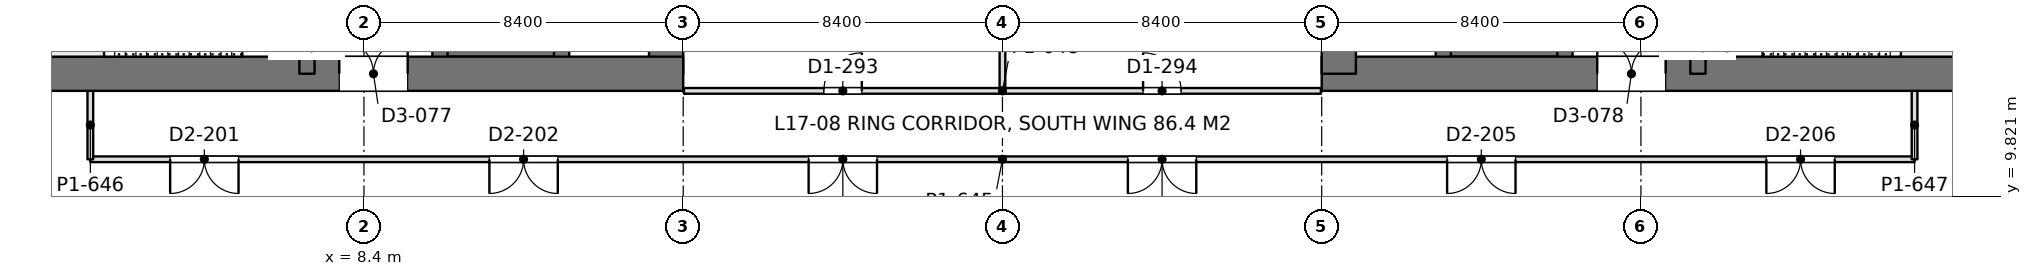
"""IFC4 building model, lengths in metres.
Left out: names, types, materials, properties, quantities, classifications, styles, units other than length and angle.
Written with IfcOpenShell. Run it as: python <this file> out.ifc"""

import sys

from ifc_helpers import new_model, si_unit, direction, frame, frame_2d, origin, place, context, subcontext, project, spatial, rectangle, extrude, element, fill, save


model = new_model("IFC4")
c1 = context("Model", 3, precision=1e-05, world=origin(), true_north=direction((0.0, 1.0)))
c2 = subcontext(c1, "Body", "Model", "MODEL_VIEW")
j1 = project(units=[si_unit("LENGTHUNIT", "METRE"), si_unit("PLANEANGLEUNIT", "RADIAN")], contexts=[c1])
p1 = place(None, origin())
s1 = spatial("IfcSite", under=j1, at=p1, CompositionType="ELEMENT")
p2 = place(p1, origin())
s2 = spatial("IfcBuilding", under=s1, at=p2, CompositionType="ELEMENT")
p3 = place(p2, frame((0.0, 0.0, 77.4)))
s3 = spatial("IfcBuildingStorey", under=s2, at=p3, CompositionType="ELEMENT", Elevation=77.4)
p4 = place(p3, frame((-1.2, 13.05, 0.0), z_axis=(0.0, 0.0, 1.0), x_axis=(1.0, 0.0, 0.0)))
e1 = element("IfcWall", 1, at=p4, inside=s3, PredefinedType="SHEAR", context=c2, shape_type="SweptSolid", body=[
    extrude(rectangle(XDim=18.0, YDim=0.9, at=frame_2d((9.0, 0.0))), origin(), (0.0, 0.0, 1.0), 4.5),
])
p5 = place(p4, frame((8.95, 0.0, 0.0)))
e2 = element("IfcOpeningElement", 2, at=p5, cuts=e1, PredefinedType="OPENING", context=c2, shape_type="SweptSolid", body=[
    extrude(rectangle(XDim=1.8, YDim=2.4, at=frame_2d((0.9, 1.2))), frame((0.0, 0.46, 0.0), z_axis=(0.0, -1.0, 0.0), x_axis=(1.0, 0.0, 0.0)), (0.0, 0.0, 1.0), 0.92),
])
p6 = place(p3, frame((16.35, 13.05, 0.0), z_axis=(0.0, 0.0, 1.0), x_axis=(0.0, 1.0, 0.0)))
e3 = element("IfcWall", 3, at=p6, inside=s3, PredefinedType="SHEAR", context=c2, shape_type="SweptSolid", body=[
    extrude(rectangle(XDim=24.3, YDim=0.9, at=frame_2d((12.15, 0.0))), origin(), (0.0, 0.0, 1.0), 4.5),
])
p7 = place(p3, frame((6.9, 13.05, 0.0), z_axis=(0.0, 0.0, 1.0), x_axis=(0.0, 1.0, 0.0)))
e4 = element("IfcWall", 4, at=p7, inside=s3, PredefinedType="SHEAR", context=c2, shape_type="SweptSolid", body=[
    extrude(rectangle(XDim=24.3, YDim=0.4, at=frame_2d((12.15, 0.0))), origin(), (0.0, 0.0, 1.0), 4.5),
])
p8 = place(p7, frame((1.3, 0.0, 0.0)))
e5 = element("IfcOpeningElement", 5, at=p8, cuts=e4, PredefinedType="OPENING", context=c2, shape_type="SweptSolid", body=[
    extrude(rectangle(XDim=1.0, YDim=2.2, at=frame_2d((0.5, 1.1))), frame((0.0, 0.21, 0.0), z_axis=(0.0, -1.0, 0.0), x_axis=(1.0, 0.0, 0.0)), (0.0, 0.0, 1.0), 0.42),
])
p9 = place(p7, frame((22.0, 0.0, 0.0)))
e6 = element("IfcOpeningElement", 6, at=p9, cuts=e4, PredefinedType="OPENING", context=c2, shape_type="SweptSolid", body=[
    extrude(rectangle(XDim=1.0, YDim=2.2, at=frame_2d((0.5, 1.1))), frame((0.0, 0.21, 0.0), z_axis=(0.0, -1.0, 0.0), x_axis=(1.0, 0.0, 0.0)), (0.0, 0.0, 1.0), 0.42),
])
p10 = place(p7, frame((5.55, 0.0, 0.0)))
e7 = element("IfcOpeningElement", 7, at=p10, cuts=e4, PredefinedType="OPENING", context=c2, shape_type="SweptSolid", body=[
    extrude(rectangle(XDim=1.0, YDim=2.2, at=frame_2d((0.5, 1.1))), frame((0.0, 0.21, 0.0), z_axis=(0.0, -1.0, 0.0), x_axis=(1.0, 0.0, 0.0)), (0.0, 0.0, 1.0), 0.42),
])
p11 = place(p7, frame((9.55, 0.0, 0.0)))
e8 = element("IfcOpeningElement", 8, at=p11, cuts=e4, PredefinedType="OPENING", context=c2, shape_type="SweptSolid", body=[
    extrude(rectangle(XDim=1.0, YDim=2.2, at=frame_2d((0.5, 1.1))), frame((0.0, 0.21, 0.0), z_axis=(0.0, -1.0, 0.0), x_axis=(1.0, 0.0, 0.0)), (0.0, 0.0, 1.0), 0.42),
])
p12 = place(p7, frame((12.8, 0.0, 0.0)))
e9 = element("IfcOpeningElement", 9, at=p12, cuts=e4, PredefinedType="OPENING", context=c2, shape_type="SweptSolid", body=[
    extrude(rectangle(XDim=1.1, YDim=2.2, at=frame_2d((0.55, 1.1))), frame((0.0, 0.21, 0.0), z_axis=(0.0, -1.0, 0.0), x_axis=(1.0, 0.0, 0.0)), (0.0, 0.0, 1.0), 0.42),
])
p13 = place(p7, frame((15.538, 0.0, 0.0)))
e10 = element("IfcOpeningElement", 10, at=p13, cuts=e4, PredefinedType="OPENING", context=c2, shape_type="SweptSolid", body=[
    extrude(rectangle(XDim=1.1, YDim=2.2, at=frame_2d((0.55, 1.1))), frame((0.0, 0.21, 0.0), z_axis=(0.0, -1.0, 0.0), x_axis=(1.0, 0.0, 0.0)), (0.0, 0.0, 1.0), 0.42),
])
p14 = place(p7, frame((18.262, 0.0, 0.0)))
e11 = element("IfcOpeningElement", 11, at=p14, cuts=e4, PredefinedType="OPENING", context=c2, shape_type="SweptSolid", body=[
    extrude(rectangle(XDim=1.1, YDim=2.2, at=frame_2d((0.55, 1.1))), frame((0.0, 0.21, 0.0), z_axis=(0.0, -1.0, 0.0), x_axis=(1.0, 0.0, 0.0)), (0.0, 0.0, 1.0), 0.42),
])
p15 = place(p3, frame((10.4, 13.05, 0.0), z_axis=(0.0, 0.0, 1.0), x_axis=(0.0, 1.0, 0.0)))
e12 = element("IfcWall", 12, at=p15, inside=s3, PredefinedType="SHEAR", context=c2, shape_type="SweptSolid", body=[
    extrude(rectangle(XDim=24.3, YDim=0.4, at=frame_2d((12.15, 0.0))), origin(), (0.0, 0.0, 1.0), 4.5),
])
p16 = place(p15, frame((1.5, 0.0, 0.0)))
e13 = element("IfcOpeningElement", 13, at=p16, cuts=e12, PredefinedType="OPENING", context=c2, shape_type="SweptSolid", body=[
    extrude(rectangle(XDim=1.1, YDim=2.2, at=frame_2d((0.55, 1.1))), frame((0.0, 0.21, 0.0), z_axis=(0.0, -1.0, 0.0), x_axis=(1.0, 0.0, 0.0)), (0.0, 0.0, 1.0), 0.42),
])
p17 = place(p15, frame((4.35, 0.0, 0.0)))
e14 = element("IfcOpeningElement", 14, at=p17, cuts=e12, PredefinedType="OPENING", context=c2, shape_type="SweptSolid", body=[
    extrude(rectangle(XDim=1.1, YDim=2.2, at=frame_2d((0.55, 1.1))), frame((0.0, 0.21, 0.0), z_axis=(0.0, -1.0, 0.0), x_axis=(1.0, 0.0, 0.0)), (0.0, 0.0, 1.0), 0.42),
])
p18 = place(p15, frame((7.2, 0.0, 0.0)))
e15 = element("IfcOpeningElement", 15, at=p18, cuts=e12, PredefinedType="OPENING", context=c2, shape_type="SweptSolid", body=[
    extrude(rectangle(XDim=1.1, YDim=2.2, at=frame_2d((0.55, 1.1))), frame((0.0, 0.21, 0.0), z_axis=(0.0, -1.0, 0.0), x_axis=(1.0, 0.0, 0.0)), (0.0, 0.0, 1.0), 0.42),
])
p19 = place(p15, frame((21.45, 0.0, 0.0)))
e16 = element("IfcOpeningElement", 16, at=p19, cuts=e12, PredefinedType="OPENING", context=c2, shape_type="SweptSolid", body=[
    extrude(rectangle(XDim=1.1, YDim=2.2, at=frame_2d((0.55, 1.1))), frame((0.0, 0.21, 0.0), z_axis=(0.0, -1.0, 0.0), x_axis=(1.0, 0.0, 0.0)), (0.0, 0.0, 1.0), 0.42),
])
p20 = place(p3, frame((13.6, 13.05, 0.0), z_axis=(0.0, 0.0, 1.0), x_axis=(0.0, 1.0, 0.0)))
e17 = element("IfcWall", 17, at=p20, inside=s3, PredefinedType="SHEAR", context=c2, shape_type="SweptSolid", body=[
    extrude(rectangle(XDim=24.3, YDim=0.4, at=frame_2d((12.15, 0.0))), origin(), (0.0, 0.0, 1.0), 4.5),
])
p21 = place(p3, frame((10.4, 13.65, 0.0), z_axis=(0.0, 0.0, 1.0), x_axis=(1.0, 0.0, 0.0)))
e18 = element("IfcWall", 18, at=p21, inside=s3, PredefinedType="SHEAR", context=c2, shape_type="SweptSolid", body=[
    extrude(rectangle(XDim=3.2, YDim=0.3, at=frame_2d((1.6, 0.0))), origin(), (0.0, 0.0, 1.0), 4.5),
])
p22 = place(p3, frame((33.6, 13.05, 0.0), z_axis=(0.0, 0.0, 1.0), x_axis=(1.0, 0.0, 0.0)))
e19 = element("IfcWall", 19, at=p22, inside=s3, PredefinedType="SHEAR", context=c2, shape_type="SweptSolid", body=[
    extrude(rectangle(XDim=18.0, YDim=0.9, at=frame_2d((9.0, 0.0))), origin(), (0.0, 0.0, 1.0), 4.5),
])
p23 = place(p22, frame((7.25, 0.0, 0.0)))
e20 = element("IfcOpeningElement", 20, at=p23, cuts=e19, PredefinedType="OPENING", context=c2, shape_type="SweptSolid", body=[
    extrude(rectangle(XDim=1.8, YDim=2.4, at=frame_2d((0.9, 1.2))), frame((0.0, 0.46, 0.0), z_axis=(0.0, -1.0, 0.0), x_axis=(1.0, 0.0, 0.0)), (0.0, 0.0, 1.0), 0.92),
])
p24 = place(p3, frame((34.05, 13.05, 0.0), z_axis=(0.0, 0.0, 1.0), x_axis=(0.0, 1.0, 0.0)))
e21 = element("IfcWall", 21, at=p24, inside=s3, PredefinedType="SHEAR", context=c2, shape_type="SweptSolid", body=[
    extrude(rectangle(XDim=24.3, YDim=0.9, at=frame_2d((12.15, 0.0))), origin(), (0.0, 0.0, 1.0), 4.5),
])
p25 = place(p3, frame((43.5, 13.05, 0.0), z_axis=(0.0, 0.0, 1.0), x_axis=(0.0, 1.0, 0.0)))
e22 = element("IfcWall", 22, at=p25, inside=s3, PredefinedType="SHEAR", context=c2, shape_type="SweptSolid", body=[
    extrude(rectangle(XDim=24.3, YDim=0.4, at=frame_2d((12.15, 0.0))), origin(), (0.0, 0.0, 1.0), 4.5),
])
p26 = place(p25, frame((1.3, 0.0, 0.0)))
e23 = element("IfcOpeningElement", 23, at=p26, cuts=e22, PredefinedType="OPENING", context=c2, shape_type="SweptSolid", body=[
    extrude(rectangle(XDim=1.0, YDim=2.2, at=frame_2d((0.5, 1.1))), frame((0.0, 0.21, 0.0), z_axis=(0.0, -1.0, 0.0), x_axis=(1.0, 0.0, 0.0)), (0.0, 0.0, 1.0), 0.42),
])
p27 = place(p25, frame((22.0, 0.0, 0.0)))
e24 = element("IfcOpeningElement", 24, at=p27, cuts=e22, PredefinedType="OPENING", context=c2, shape_type="SweptSolid", body=[
    extrude(rectangle(XDim=1.0, YDim=2.2, at=frame_2d((0.5, 1.1))), frame((0.0, 0.21, 0.0), z_axis=(0.0, -1.0, 0.0), x_axis=(1.0, 0.0, 0.0)), (0.0, 0.0, 1.0), 0.42),
])
p28 = place(p25, frame((5.55, 0.0, 0.0)))
e25 = element("IfcOpeningElement", 25, at=p28, cuts=e22, PredefinedType="OPENING", context=c2, shape_type="SweptSolid", body=[
    extrude(rectangle(XDim=1.0, YDim=2.2, at=frame_2d((0.5, 1.1))), frame((0.0, 0.21, 0.0), z_axis=(0.0, -1.0, 0.0), x_axis=(1.0, 0.0, 0.0)), (0.0, 0.0, 1.0), 0.42),
])
p29 = place(p25, frame((9.55, 0.0, 0.0)))
e26 = element("IfcOpeningElement", 26, at=p29, cuts=e22, PredefinedType="OPENING", context=c2, shape_type="SweptSolid", body=[
    extrude(rectangle(XDim=1.0, YDim=2.2, at=frame_2d((0.5, 1.1))), frame((0.0, 0.21, 0.0), z_axis=(0.0, -1.0, 0.0), x_axis=(1.0, 0.0, 0.0)), (0.0, 0.0, 1.0), 0.42),
])
p30 = place(p25, frame((12.8, 0.0, 0.0)))
e27 = element("IfcOpeningElement", 27, at=p30, cuts=e22, PredefinedType="OPENING", context=c2, shape_type="SweptSolid", body=[
    extrude(rectangle(XDim=1.1, YDim=2.2, at=frame_2d((0.55, 1.1))), frame((0.0, 0.21, 0.0), z_axis=(0.0, -1.0, 0.0), x_axis=(1.0, 0.0, 0.0)), (0.0, 0.0, 1.0), 0.42),
])
p31 = place(p25, frame((15.538, 0.0, 0.0)))
e28 = element("IfcOpeningElement", 28, at=p31, cuts=e22, PredefinedType="OPENING", context=c2, shape_type="SweptSolid", body=[
    extrude(rectangle(XDim=1.1, YDim=2.2, at=frame_2d((0.55, 1.1))), frame((0.0, 0.21, 0.0), z_axis=(0.0, -1.0, 0.0), x_axis=(1.0, 0.0, 0.0)), (0.0, 0.0, 1.0), 0.42),
])
p32 = place(p25, frame((18.262, 0.0, 0.0)))
e29 = element("IfcOpeningElement", 29, at=p32, cuts=e22, PredefinedType="OPENING", context=c2, shape_type="SweptSolid", body=[
    extrude(rectangle(XDim=1.1, YDim=2.2, at=frame_2d((0.55, 1.1))), frame((0.0, 0.21, 0.0), z_axis=(0.0, -1.0, 0.0), x_axis=(1.0, 0.0, 0.0)), (0.0, 0.0, 1.0), 0.42),
])
p33 = place(p3, frame((40.0, 13.05, 0.0), z_axis=(0.0, 0.0, 1.0), x_axis=(0.0, 1.0, 0.0)))
e30 = element("IfcWall", 30, at=p33, inside=s3, PredefinedType="SHEAR", context=c2, shape_type="SweptSolid", body=[
    extrude(rectangle(XDim=24.3, YDim=0.4, at=frame_2d((12.15, 0.0))), origin(), (0.0, 0.0, 1.0), 4.5),
])
p34 = place(p33, frame((1.5, 0.0, 0.0)))
e31 = element("IfcOpeningElement", 31, at=p34, cuts=e30, PredefinedType="OPENING", context=c2, shape_type="SweptSolid", body=[
    extrude(rectangle(XDim=1.1, YDim=2.2, at=frame_2d((0.55, 1.1))), frame((0.0, 0.21, 0.0), z_axis=(0.0, -1.0, 0.0), x_axis=(1.0, 0.0, 0.0)), (0.0, 0.0, 1.0), 0.42),
])
p35 = place(p33, frame((4.35, 0.0, 0.0)))
e32 = element("IfcOpeningElement", 32, at=p35, cuts=e30, PredefinedType="OPENING", context=c2, shape_type="SweptSolid", body=[
    extrude(rectangle(XDim=1.1, YDim=2.2, at=frame_2d((0.55, 1.1))), frame((0.0, 0.21, 0.0), z_axis=(0.0, -1.0, 0.0), x_axis=(1.0, 0.0, 0.0)), (0.0, 0.0, 1.0), 0.42),
])
p36 = place(p33, frame((7.2, 0.0, 0.0)))
e33 = element("IfcOpeningElement", 33, at=p36, cuts=e30, PredefinedType="OPENING", context=c2, shape_type="SweptSolid", body=[
    extrude(rectangle(XDim=1.1, YDim=2.2, at=frame_2d((0.55, 1.1))), frame((0.0, 0.21, 0.0), z_axis=(0.0, -1.0, 0.0), x_axis=(1.0, 0.0, 0.0)), (0.0, 0.0, 1.0), 0.42),
])
p37 = place(p33, frame((21.45, 0.0, 0.0)))
e34 = element("IfcOpeningElement", 34, at=p37, cuts=e30, PredefinedType="OPENING", context=c2, shape_type="SweptSolid", body=[
    extrude(rectangle(XDim=1.1, YDim=2.2, at=frame_2d((0.55, 1.1))), frame((0.0, 0.21, 0.0), z_axis=(0.0, -1.0, 0.0), x_axis=(1.0, 0.0, 0.0)), (0.0, 0.0, 1.0), 0.42),
])
p38 = place(p3, frame((36.8, 13.05, 0.0), z_axis=(0.0, 0.0, 1.0), x_axis=(0.0, 1.0, 0.0)))
e35 = element("IfcWall", 35, at=p38, inside=s3, PredefinedType="SHEAR", context=c2, shape_type="SweptSolid", body=[
    extrude(rectangle(XDim=24.3, YDim=0.4, at=frame_2d((12.15, 0.0))), origin(), (0.0, 0.0, 1.0), 4.5),
])
p39 = place(p3, frame((40.0, 13.65, 0.0), z_axis=(0.0, 0.0, 1.0), x_axis=(-1.0, 0.0, 0.0)))
e36 = element("IfcWall", 36, at=p39, inside=s3, PredefinedType="SHEAR", context=c2, shape_type="SweptSolid", body=[
    extrude(rectangle(XDim=3.2, YDim=0.3, at=frame_2d((1.6, 0.0))), origin(), (0.0, 0.0, 1.0), 4.5),
])
p40 = place(p3, frame((1.2, 10.8, 0.0), z_axis=(0.0, 0.0, 1.0), x_axis=(1.0, 0.0, 0.0)))
e37 = element("IfcWall", 37, at=p40, inside=s3, PredefinedType="PARTITIONING", context=c2, shape_type="SweptSolid", body=[
    extrude(rectangle(XDim=48.0, YDim=0.15, at=frame_2d((24.0, 0.0))), origin(), (0.0, 0.0, 1.0), 3.74),
])
p41 = place(p40, frame((2.1, 0.0, 0.0)))
e38 = element("IfcOpeningElement", 38, at=p41, cuts=e37, PredefinedType="OPENING", context=c2, shape_type="SweptSolid", body=[
    extrude(rectangle(XDim=1.8, YDim=2.2, at=frame_2d((0.9, 1.1))), frame((0.0, 0.085, 0.0), z_axis=(0.0, -1.0, 0.0), x_axis=(1.0, 0.0, 0.0)), (0.0, 0.0, 1.0), 0.17),
])
p42 = place(p40, frame((10.5, 0.0, 0.0)))
e39 = element("IfcOpeningElement", 39, at=p42, cuts=e37, PredefinedType="OPENING", context=c2, shape_type="SweptSolid", body=[
    extrude(rectangle(XDim=1.8, YDim=2.2, at=frame_2d((0.9, 1.1))), frame((0.0, 0.085, 0.0), z_axis=(0.0, -1.0, 0.0), x_axis=(1.0, 0.0, 0.0)), (0.0, 0.0, 1.0), 0.17),
])
p43 = place(p40, frame((18.9, 0.0, 0.0)))
e40 = element("IfcOpeningElement", 40, at=p43, cuts=e37, PredefinedType="OPENING", context=c2, shape_type="SweptSolid", body=[
    extrude(rectangle(XDim=1.8, YDim=2.2, at=frame_2d((0.9, 1.1))), frame((0.0, 0.085, 0.0), z_axis=(0.0, -1.0, 0.0), x_axis=(1.0, 0.0, 0.0)), (0.0, 0.0, 1.0), 0.17),
])
p44 = place(p40, frame((27.3, 0.0, 0.0)))
e41 = element("IfcOpeningElement", 41, at=p44, cuts=e37, PredefinedType="OPENING", context=c2, shape_type="SweptSolid", body=[
    extrude(rectangle(XDim=1.8, YDim=2.2, at=frame_2d((0.9, 1.1))), frame((0.0, 0.085, 0.0), z_axis=(0.0, -1.0, 0.0), x_axis=(1.0, 0.0, 0.0)), (0.0, 0.0, 1.0), 0.17),
])
p45 = place(p40, frame((35.7, 0.0, 0.0)))
e42 = element("IfcOpeningElement", 42, at=p45, cuts=e37, PredefinedType="OPENING", context=c2, shape_type="SweptSolid", body=[
    extrude(rectangle(XDim=1.8, YDim=2.2, at=frame_2d((0.9, 1.1))), frame((0.0, 0.085, 0.0), z_axis=(0.0, -1.0, 0.0), x_axis=(1.0, 0.0, 0.0)), (0.0, 0.0, 1.0), 0.17),
])
p46 = place(p40, frame((44.1, 0.0, 0.0)))
e43 = element("IfcOpeningElement", 43, at=p46, cuts=e37, PredefinedType="OPENING", context=c2, shape_type="SweptSolid", body=[
    extrude(rectangle(XDim=1.8, YDim=2.2, at=frame_2d((0.9, 1.1))), frame((0.0, 0.085, 0.0), z_axis=(0.0, -1.0, 0.0), x_axis=(1.0, 0.0, 0.0)), (0.0, 0.0, 1.0), 0.17),
])
for number, where, z_axis, x_axis in (
    (44, (1.2, 10.8, 0.0), (0.0, 0.0, 1.0), (0.0, 1.0, 0.0)),
    (45, (49.2, 10.8, 0.0), (0.0, 0.0, 1.0), (0.0, 1.0, 0.0)),
):
    element("IfcWall", number, at=place(p3, frame(where, z_axis=z_axis, x_axis=x_axis)), inside=s3, PredefinedType="PARTITIONING", context=c2, shape_type="SweptSolid", body=[
        extrude(rectangle(XDim=1.802, YDim=0.15, at=frame_2d((0.901, 0.0))), origin(), (0.0, 0.0, 1.0), 4.34),
    ])
p47 = place(p3, frame((16.82, 12.6, 0.0), z_axis=(0.0, 0.0, 1.0), x_axis=(1.0, 0.0, 0.0)))
e46 = element("IfcWall", 46, at=p47, inside=s3, PredefinedType="PARTITIONING", context=c2, shape_type="SweptSolid", body=[
    extrude(rectangle(XDim=16.76, YDim=0.15, at=frame_2d((8.38, 0.0))), origin(), (0.0, 0.0, 1.0), 3.74),
])
p48 = place(p47, frame((3.68, 0.0, 0.0)))
e47 = element("IfcOpeningElement", 47, at=p48, cuts=e46, PredefinedType="OPENING", context=c2, shape_type="SweptSolid", body=[
    extrude(rectangle(XDim=1.0, YDim=2.2, at=frame_2d((0.5, 1.1))), frame((0.0, 0.085, 0.0), z_axis=(0.0, -1.0, 0.0), x_axis=(1.0, 0.0, 0.0)), (0.0, 0.0, 1.0), 0.17),
])
p49 = place(p47, frame((12.08, 0.0, 0.0)))
e48 = element("IfcOpeningElement", 48, at=p49, cuts=e46, PredefinedType="OPENING", context=c2, shape_type="SweptSolid", body=[
    extrude(rectangle(XDim=1.0, YDim=2.2, at=frame_2d((0.5, 1.1))), frame((0.0, 0.085, 0.0), z_axis=(0.0, -1.0, 0.0), x_axis=(1.0, 0.0, 0.0)), (0.0, 0.0, 1.0), 0.17),
])
p50 = place(p3, frame((25.2, 12.674, 0.0), z_axis=(0.0, 0.0, 1.0), x_axis=(0.0, 1.0, 0.0)))
e49 = element("IfcWall", 49, at=p50, inside=s3, PredefinedType="PARTITIONING", context=c2, shape_type="SweptSolid", body=[
    extrude(rectangle(XDim=3.527, YDim=0.15, at=frame_2d((1.763, 0.0))), origin(), (0.0, 0.0, 1.0), 3.74),
])
p51 = place(p5, origin())
e50 = element("IfcDoor", 50, at=p51, inside=s3, OperationType="DOUBLE_DOOR_SINGLE_SWING", PredefinedType="DOOR", context=c2, shape_type="SweptSolid", body=[
    extrude(rectangle(XDim=1.8, YDim=2.4, at=frame_2d((0.9, 1.2))), frame((0.0, 0.025, 0.0), z_axis=(0.0, -1.0, 0.0), x_axis=(1.0, 0.0, 0.0)), (0.0, 0.0, 1.0), 0.05),
])
fill(e2, e50)
p52 = place(p23, origin())
e51 = element("IfcDoor", 51, at=p52, inside=s3, OperationType="DOUBLE_DOOR_SINGLE_SWING", PredefinedType="DOOR", context=c2, shape_type="SweptSolid", body=[
    extrude(rectangle(XDim=1.8, YDim=2.4, at=frame_2d((0.9, 1.2))), frame((0.0, 0.025, 0.0), z_axis=(0.0, -1.0, 0.0), x_axis=(1.0, 0.0, 0.0)), (0.0, 0.0, 1.0), 0.05),
])
fill(e20, e51)
p53 = place(p41, frame((1.8, 0.0, 0.0), z_axis=(0.0, 0.0, 1.0), x_axis=(-1.0, 0.0, 0.0)))
e52 = element("IfcDoor", 52, at=p53, inside=s3, OperationType="DOUBLE_DOOR_SINGLE_SWING", PredefinedType="DOOR", context=c2, shape_type="SweptSolid", body=[
    extrude(rectangle(XDim=1.8, YDim=2.2, at=frame_2d((0.9, 1.1))), frame((0.0, 0.025, 0.0), z_axis=(0.0, -1.0, 0.0), x_axis=(1.0, 0.0, 0.0)), (0.0, 0.0, 1.0), 0.05),
])
fill(e38, e52)
p54 = place(p42, frame((1.8, 0.0, 0.0), z_axis=(0.0, 0.0, 1.0), x_axis=(-1.0, 0.0, 0.0)))
e53 = element("IfcDoor", 53, at=p54, inside=s3, OperationType="DOUBLE_DOOR_SINGLE_SWING", PredefinedType="DOOR", context=c2, shape_type="SweptSolid", body=[
    extrude(rectangle(XDim=1.8, YDim=2.2, at=frame_2d((0.9, 1.1))), frame((0.0, 0.025, 0.0), z_axis=(0.0, -1.0, 0.0), x_axis=(1.0, 0.0, 0.0)), (0.0, 0.0, 1.0), 0.05),
])
fill(e39, e53)
p55 = place(p43, frame((1.8, 0.0, 0.0), z_axis=(0.0, 0.0, 1.0), x_axis=(-1.0, 0.0, 0.0)))
e54 = element("IfcDoor", 54, at=p55, inside=s3, OperationType="DOUBLE_DOOR_SINGLE_SWING", PredefinedType="DOOR", context=c2, shape_type="SweptSolid", body=[
    extrude(rectangle(XDim=1.8, YDim=2.2, at=frame_2d((0.9, 1.1))), frame((0.0, 0.025, 0.0), z_axis=(0.0, -1.0, 0.0), x_axis=(1.0, 0.0, 0.0)), (0.0, 0.0, 1.0), 0.05),
])
fill(e40, e54)
p56 = place(p44, frame((1.8, 0.0, 0.0), z_axis=(0.0, 0.0, 1.0), x_axis=(-1.0, 0.0, 0.0)))
e55 = element("IfcDoor", 55, at=p56, inside=s3, OperationType="DOUBLE_DOOR_SINGLE_SWING", PredefinedType="DOOR", context=c2, shape_type="SweptSolid", body=[
    extrude(rectangle(XDim=1.8, YDim=2.2, at=frame_2d((0.9, 1.1))), frame((0.0, 0.025, 0.0), z_axis=(0.0, -1.0, 0.0), x_axis=(1.0, 0.0, 0.0)), (0.0, 0.0, 1.0), 0.05),
])
fill(e41, e55)
p57 = place(p45, frame((1.8, 0.0, 0.0), z_axis=(0.0, 0.0, 1.0), x_axis=(-1.0, 0.0, 0.0)))
e56 = element("IfcDoor", 56, at=p57, inside=s3, OperationType="DOUBLE_DOOR_SINGLE_SWING", PredefinedType="DOOR", context=c2, shape_type="SweptSolid", body=[
    extrude(rectangle(XDim=1.8, YDim=2.2, at=frame_2d((0.9, 1.1))), frame((0.0, 0.025, 0.0), z_axis=(0.0, -1.0, 0.0), x_axis=(1.0, 0.0, 0.0)), (0.0, 0.0, 1.0), 0.05),
])
fill(e42, e56)
p58 = place(p46, frame((1.8, 0.0, 0.0), z_axis=(0.0, 0.0, 1.0), x_axis=(-1.0, 0.0, 0.0)))
e57 = element("IfcDoor", 57, at=p58, inside=s3, OperationType="DOUBLE_DOOR_SINGLE_SWING", PredefinedType="DOOR", context=c2, shape_type="SweptSolid", body=[
    extrude(rectangle(XDim=1.8, YDim=2.2, at=frame_2d((0.9, 1.1))), frame((0.0, 0.025, 0.0), z_axis=(0.0, -1.0, 0.0), x_axis=(1.0, 0.0, 0.0)), (0.0, 0.0, 1.0), 0.05),
])
fill(e43, e57)
p59 = place(p48, origin())
e58 = element("IfcDoor", 58, at=p59, inside=s3, OperationType="SINGLE_SWING_RIGHT", PredefinedType="DOOR", context=c2, shape_type="SweptSolid", body=[
    extrude(rectangle(XDim=1.0, YDim=2.2, at=frame_2d((0.5, 1.1))), frame((0.0, 0.025, 0.0), z_axis=(0.0, -1.0, 0.0), x_axis=(1.0, 0.0, 0.0)), (0.0, 0.0, 1.0), 0.05),
])
fill(e47, e58)
p60 = place(p49, origin())
e59 = element("IfcDoor", 59, at=p60, inside=s3, OperationType="SINGLE_SWING_LEFT", PredefinedType="DOOR", context=c2, shape_type="SweptSolid", body=[
    extrude(rectangle(XDim=1.0, YDim=2.2, at=frame_2d((0.5, 1.1))), frame((0.0, 0.025, 0.0), z_axis=(0.0, -1.0, 0.0), x_axis=(1.0, 0.0, 0.0)), (0.0, 0.0, 1.0), 0.05),
])
fill(e48, e59)
save(model, sys.argv[1])
